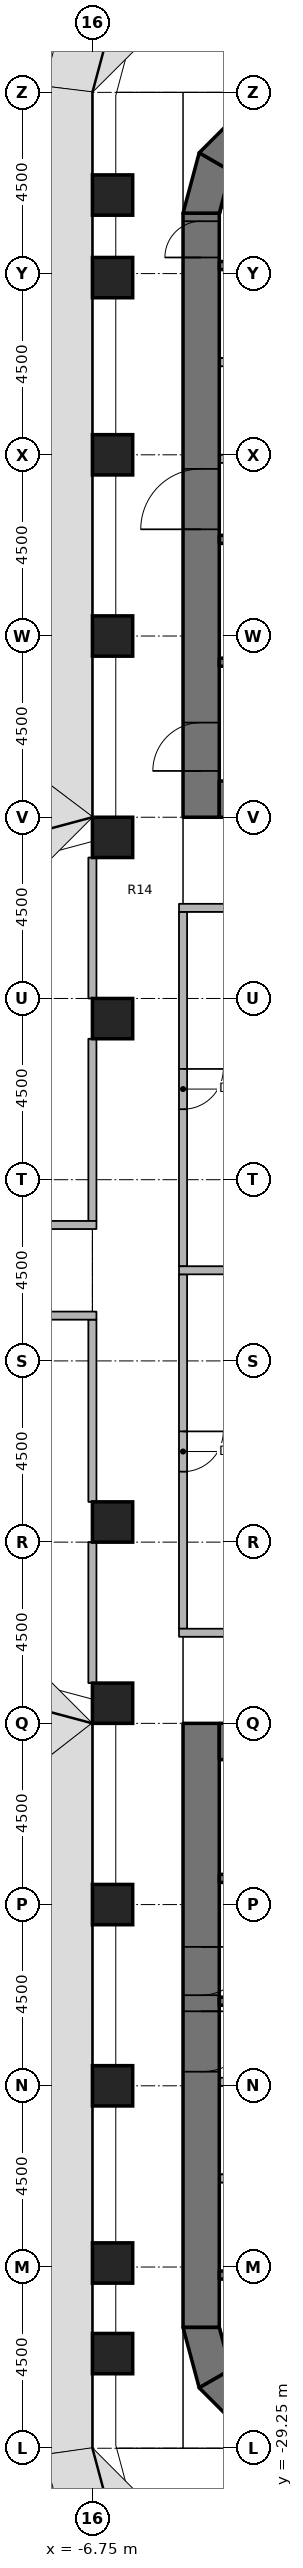
"""IFC4 building model, lengths in metres.
Left out: names, types, materials, properties, quantities, classifications, styles, units other than length and angle.
Written with IfcOpenShell. Run it as: python <this file> out.ifc"""

import sys

from ifc_helpers import new_model, si_unit, direction, frame, frame_2d, origin, origin_2d, place, context, subcontext, project, spatial, polyline, rectangle, outline, extrude, element, fill, save


model = new_model("IFC4")
c1 = context("Model", 3, precision=1e-05, world=origin(), true_north=direction((0.0, 1.0)))
c2 = subcontext(c1, "Body", "Model", "MODEL_VIEW")
j1 = project(units=[si_unit("LENGTHUNIT", "METRE"), si_unit("PLANEANGLEUNIT", "RADIAN")], contexts=[c1])
p1 = place(None, origin())
s1 = spatial("IfcSite", under=j1, at=p1, CompositionType="ELEMENT")
p2 = place(p1, origin())
s2 = spatial("IfcBuilding", under=s1, at=p2, CompositionType="ELEMENT")
p3 = place(p2, frame((0.0, 0.0, 56.4)))
s3 = spatial("IfcBuildingStorey", under=s2, at=p3, CompositionType="ELEMENT", Elevation=56.4)
for number, where, z_axis, x_axis in (
    (1, (-6.25, -26.9, 0.0), (0.0, 0.0, 1.0), (1.0, 0.0, 0.0)),
    (2, (-6.25, -24.65, 0.0), (0.0, 0.0, 1.0), (1.0, 0.0, 0.0)),
    (3, (-6.25, -20.25, 0.0), (0.0, 0.0, 1.0), (1.0, 0.0, 0.0)),
    (4, (-6.25, -15.75, 0.0), (0.0, 0.0, 1.0), (1.0, 0.0, 0.0)),
    (5, (-6.25, -10.75, 0.0), (0.0, 0.0, 1.0), (1.0, 0.0, 0.0)),
    (6, (-6.25, -6.25, 0.0), (0.0, 0.0, 1.0), (1.0, 0.0, 0.0)),
    (7, (-6.25, 6.25, 0.0), (0.0, 0.0, 1.0), (1.0, 0.0, 0.0)),
    (8, (-6.25, 10.75, 0.0), (0.0, 0.0, 1.0), (1.0, 0.0, 0.0)),
    (9, (-6.25, 15.75, 0.0), (0.0, 0.0, 1.0), (1.0, 0.0, 0.0)),
    (10, (-6.25, 20.25, 0.0), (0.0, 0.0, 1.0), (1.0, 0.0, 0.0)),
    (11, (-6.25, 24.65, 0.0), (0.0, 0.0, 1.0), (1.0, 0.0, 0.0)),
    (12, (-6.25, 26.7, 0.0), (0.0, 0.0, 1.0), (1.0, 0.0, 0.0)),
):
    element("IfcColumn", number, at=place(p3, frame(where, z_axis=z_axis, x_axis=x_axis)), inside=s3, PredefinedType="COLUMN", context=c2, shape_type="SweptSolid", body=[
        extrude(rectangle(XDim=1.0, YDim=1.0, at=origin_2d()), origin(), (0.0, 0.0, 1.0), 4.05),
    ])
p4 = place(p3, frame((-4.05, 11.25, 0.0), z_axis=(0.0, 0.0, 1.0), x_axis=(0.0, 1.0, 0.0)))
e13 = element("IfcWall", 13, at=p4, inside=s3, PredefinedType="SHEAR", context=c2, shape_type="SweptSolid", body=[
    extrude(rectangle(XDim=15.0, YDim=0.9, at=frame_2d((7.5, 0.0))), origin(), (0.0, 0.0, 1.0), 4.2),
])
p5 = place(p4, frame((7.15, 0.0, 0.0)))
e14 = element("IfcOpeningElement", 14, at=p5, cuts=e13, PredefinedType="OPENING", context=c2, shape_type="SweptSolid", body=[
    extrude(rectangle(XDim=1.5, YDim=2.3, at=frame_2d((0.75, 1.15))), frame((0.0, 0.46, 0.0), z_axis=(0.0, -1.0, 0.0), x_axis=(1.0, 0.0, 0.0)), (0.0, 0.0, 1.0), 0.92),
])
p6 = place(p4, frame((13.9, 0.0, 0.0)))
e15 = element("IfcOpeningElement", 15, at=p6, cuts=e13, PredefinedType="OPENING", context=c2, shape_type="SweptSolid", body=[
    extrude(rectangle(XDim=0.9, YDim=2.1, at=frame_2d((0.45, 1.05))), frame((0.0, 0.46, 0.0), z_axis=(0.0, -1.0, 0.0), x_axis=(1.0, 0.0, 0.0)), (0.0, 0.0, 1.0), 0.92),
])
p7 = place(p4, frame((1.15, 0.0, 0.0)))
e16 = element("IfcOpeningElement", 16, at=p7, cuts=e13, PredefinedType="OPENING", context=c2, shape_type="SweptSolid", body=[
    extrude(rectangle(XDim=1.2, YDim=2.1, at=frame_2d((0.6, 1.05))), frame((0.0, 0.46, 0.0), z_axis=(0.0, -1.0, 0.0), x_axis=(1.0, 0.0, 0.0)), (0.0, 0.0, 1.0), 0.92),
])
p8 = place(p3, frame((-3.6, 11.7, 0.0), z_axis=(0.0, 0.0, 1.0), x_axis=(1.0, 0.0, 0.0)))
e17 = element("IfcWall", 17, at=p8, inside=s3, PredefinedType="SHEAR", context=c2, shape_type="SweptSolid", body=[
    extrude(rectangle(XDim=7.2, YDim=0.9, at=frame_2d((3.6, 0.0))), origin(), (0.0, 0.0, 1.0), 4.2),
])
p9 = place(p3, origin())
e18 = element("IfcWall", 18, at=p9, inside=s3, PredefinedType="SHEAR", context=c2, shape_type="SweptSolid", body=[
    extrude(outline(polyline([(-4.5, 26.25), (-4.098, 27.75), (-3.319, 27.3), (-3.6, 26.25), (-4.5, 26.25)])), origin(), (0.0, 0.0, 1.0), 4.2),
])
p10 = place(p3, origin())
e19 = element("IfcWall", 19, at=p10, inside=s3, PredefinedType="SHEAR", context=c2, shape_type="SweptSolid", body=[
    extrude(outline(polyline([(-4.098, 27.75), (-3.0, 28.848), (-2.55, 28.069), (-3.319, 27.3), (-4.098, 27.75)])), origin(), (0.0, 0.0, 1.0), 4.2),
])
p11 = place(p3, frame((-4.05, -11.25, 0.0), z_axis=(0.0, 0.0, 1.0), x_axis=(0.0, -1.0, 0.0)))
e20 = element("IfcWall", 20, at=p11, inside=s3, PredefinedType="SHEAR", context=c2, shape_type="SweptSolid", body=[
    extrude(rectangle(XDim=15.0, YDim=0.9, at=frame_2d((7.5, 0.0))), origin(), (0.0, 0.0, 1.0), 4.2),
])
p12 = place(p11, frame((7.15, 0.0, 0.0)))
e21 = element("IfcOpeningElement", 21, at=p12, cuts=e20, PredefinedType="OPENING", context=c2, shape_type="SweptSolid", body=[
    extrude(rectangle(XDim=1.5, YDim=2.3, at=frame_2d((0.75, 1.15))), frame((0.0, 0.46, 0.0), z_axis=(0.0, -1.0, 0.0), x_axis=(1.0, 0.0, 0.0)), (0.0, 0.0, 1.0), 0.92),
])
p13 = place(p11, frame((5.55, 0.0, 0.0)))
e22 = element("IfcOpeningElement", 22, at=p13, cuts=e20, PredefinedType="OPENING", context=c2, shape_type="SweptSolid", body=[
    extrude(rectangle(XDim=1.2, YDim=2.1, at=frame_2d((0.6, 1.05))), frame((0.0, 0.46, 0.0), z_axis=(0.0, -1.0, 0.0), x_axis=(1.0, 0.0, 0.0)), (0.0, 0.0, 1.0), 0.92),
])
p14 = place(p3, frame((-3.6, -11.7, 0.0), z_axis=(0.0, 0.0, 1.0), x_axis=(1.0, 0.0, 0.0)))
e23 = element("IfcWall", 23, at=p14, inside=s3, PredefinedType="SHEAR", context=c2, shape_type="SweptSolid", body=[
    extrude(rectangle(XDim=7.2, YDim=0.9, at=frame_2d((3.6, 0.0))), origin(), (0.0, 0.0, 1.0), 4.2),
])
p15 = place(p3, origin())
e24 = element("IfcWall", 24, at=p15, inside=s3, PredefinedType="SHEAR", context=c2, shape_type="SweptSolid", body=[
    extrude(outline(polyline([(-4.5, -26.25), (-4.098, -27.75), (-3.319, -27.3), (-3.6, -26.25), (-4.5, -26.25)])), origin(), (0.0, 0.0, 1.0), 4.2),
])
p16 = place(p3, origin())
e25 = element("IfcWall", 25, at=p16, inside=s3, PredefinedType="SHEAR", context=c2, shape_type="SweptSolid", body=[
    extrude(outline(polyline([(-4.098, -27.75), (-3.0, -28.848), (-2.55, -28.069), (-3.319, -27.3), (-4.098, -27.75)])), origin(), (0.0, 0.0, 1.0), 4.2),
])
for number, where, z_axis, x_axis in (
    (26, (-3.6, 24.95, 0.0), (0.0, 0.0, 1.0), (1.0, 0.0, 0.0)),
    (27, (-3.6, 18.15, 0.0), (0.0, 0.0, 1.0), (1.0, 0.0, 0.0)),
    (28, (-3.6, 15.1, 0.0), (0.0, 0.0, 1.0), (1.0, 0.0, 0.0)),
):
    element("IfcWall", number, at=place(p3, frame(where, z_axis=z_axis, x_axis=x_axis)), inside=s3, PredefinedType="SHEAR", context=c2, shape_type="SweptSolid", body=[
        extrude(rectangle(XDim=7.2, YDim=0.2, at=frame_2d((3.6, 0.0))), origin(), (0.0, 0.0, 1.0), 4.05),
    ])
p17 = place(p3, frame((-3.6, 20.15, 0.0), z_axis=(0.0, 0.0, 1.0), x_axis=(1.0, 0.0, 0.0)))
e29 = element("IfcWall", 29, at=p17, inside=s3, PredefinedType="PARTITIONING", context=c2, shape_type="SweptSolid", body=[
    extrude(rectangle(XDim=2.7, YDim=0.2, at=frame_2d((1.35, 0.0))), origin(), (0.0, 0.0, 1.0), 4.05),
])
p18 = place(p3, frame((-3.6, 22.55, 0.0), z_axis=(0.0, 0.0, 1.0), x_axis=(1.0, 0.0, 0.0)))
e30 = element("IfcWall", 30, at=p18, inside=s3, PredefinedType="PARTITIONING", context=c2, shape_type="SweptSolid", body=[
    extrude(rectangle(XDim=2.5, YDim=0.2, at=frame_2d((1.25, 0.0))), origin(), (0.0, 0.0, 1.0), 4.05),
])
for number, where, z_axis, x_axis in (
    (31, (3.6, -24.95, 0.0), (0.0, 0.0, 1.0), (-1.0, 0.0, 0.0)),
    (32, (3.6, -18.15, 0.0), (0.0, 0.0, 1.0), (-1.0, 0.0, 0.0)),
    (33, (3.6, -15.1, 0.0), (0.0, 0.0, 1.0), (-1.0, 0.0, 0.0)),
):
    element("IfcWall", number, at=place(p3, frame(where, z_axis=z_axis, x_axis=x_axis)), inside=s3, PredefinedType="SHEAR", context=c2, shape_type="SweptSolid", body=[
        extrude(rectangle(XDim=7.2, YDim=0.2, at=frame_2d((3.6, 0.0))), origin(), (0.0, 0.0, 1.0), 4.05),
    ])
p19 = place(p3, frame((-0.9, -20.15, 0.0), z_axis=(0.0, 0.0, 1.0), x_axis=(-1.0, 0.0, 0.0)))
e34 = element("IfcWall", 34, at=p19, inside=s3, PredefinedType="PARTITIONING", context=c2, shape_type="SweptSolid", body=[
    extrude(rectangle(XDim=2.7, YDim=0.2, at=frame_2d((1.35, 0.0))), origin(), (0.0, 0.0, 1.0), 4.05),
])
p20 = place(p3, frame((-1.1, -22.55, 0.0), z_axis=(0.0, 0.0, 1.0), x_axis=(-1.0, 0.0, 0.0)))
e35 = element("IfcWall", 35, at=p20, inside=s3, PredefinedType="PARTITIONING", context=c2, shape_type="SweptSolid", body=[
    extrude(rectangle(XDim=2.5, YDim=0.2, at=frame_2d((1.25, 0.0))), origin(), (0.0, 0.0, 1.0), 4.05),
])
p21 = place(p3, frame((-4.5, 8.9, 0.0), z_axis=(0.0, 0.0, 1.0), x_axis=(0.0, -1.0, 0.0)))
e36 = element("IfcWall", 36, at=p21, inside=s3, PredefinedType="PARTITIONING", context=c2, shape_type="SweptSolid", body=[
    extrude(rectangle(XDim=8.8, YDim=0.2, at=frame_2d((4.4, 0.0))), origin(), (0.0, 0.0, 1.0), 3.131),
])
p22 = place(p21, frame((3.9, 0.0, 0.0)))
e37 = element("IfcOpeningElement", 37, at=p22, cuts=e36, PredefinedType="OPENING", context=c2, shape_type="SweptSolid", body=[
    extrude(rectangle(XDim=1.0, YDim=2.1, at=frame_2d((0.5, 1.05))), frame((0.0, 0.11, 0.0), z_axis=(0.0, -1.0, 0.0), x_axis=(1.0, 0.0, 0.0)), (0.0, 0.0, 1.0), 0.22),
])
p23 = place(p3, frame((-4.5, -0.1, 0.0), z_axis=(0.0, 0.0, 1.0), x_axis=(0.0, -1.0, 0.0)))
e38 = element("IfcWall", 38, at=p23, inside=s3, PredefinedType="PARTITIONING", context=c2, shape_type="SweptSolid", body=[
    extrude(rectangle(XDim=8.8, YDim=0.2, at=frame_2d((4.4, 0.0))), origin(), (0.0, 0.0, 1.0), 3.131),
])
p24 = place(p23, frame((3.9, 0.0, 0.0)))
e39 = element("IfcOpeningElement", 39, at=p24, cuts=e38, PredefinedType="OPENING", context=c2, shape_type="SweptSolid", body=[
    extrude(rectangle(XDim=1.0, YDim=2.1, at=frame_2d((0.5, 1.05))), frame((0.0, 0.11, 0.0), z_axis=(0.0, -1.0, 0.0), x_axis=(1.0, 0.0, 0.0)), (0.0, 0.0, 1.0), 0.22),
])
p25 = place(p3, frame((-6.75, 1.225, 0.0), z_axis=(0.0, 0.0, 1.0), x_axis=(0.0, 1.0, 0.0)))
e40 = element("IfcWall", 40, at=p25, inside=s3, PredefinedType="PARTITIONING", context=c2, shape_type="SweptSolid", body=[
    extrude(rectangle(XDim=4.525, YDim=0.2, at=frame_2d((2.262, 0.0))), origin(), (0.0, 0.0, 1.0), 3.131),
])
for number, where, z_axis, x_axis in (
    (41, (-6.75, 6.75, 0.0), (0.0, 0.0, 1.0), (0.0, 1.0, 0.0)),
    (42, (-6.75, -10.25, 0.0), (0.0, 0.0, 1.0), (0.0, 1.0, 0.0)),
):
    element("IfcWall", number, at=place(p3, frame(where, z_axis=z_axis, x_axis=x_axis)), inside=s3, PredefinedType="PARTITIONING", context=c2, shape_type="SweptSolid", body=[
        extrude(rectangle(XDim=3.5, YDim=0.2, at=frame_2d((1.75, 0.0))), origin(), (0.0, 0.0, 1.0), 3.131),
    ])
p26 = place(p3, frame((-6.75, -5.75, 0.0), z_axis=(0.0, 0.0, 1.0), x_axis=(0.0, 1.0, 0.0)))
e43 = element("IfcWall", 43, at=p26, inside=s3, PredefinedType="PARTITIONING", context=c2, shape_type="SweptSolid", body=[
    extrude(rectangle(XDim=4.525, YDim=0.2, at=frame_2d((2.262, 0.0))), origin(), (0.0, 0.0, 1.0), 3.131),
])
for number, where, z_axis, x_axis in (
    (44, (-4.6, 9.0, 0.0), (0.0, 0.0, 1.0), (1.0, 0.0, 0.0)),
    (45, (-4.6, -9.0, 0.0), (0.0, 0.0, 1.0), (1.0, 0.0, 0.0)),
    (46, (-4.6, 0.0, 0.0), (0.0, 0.0, 1.0), (1.0, 0.0, 0.0)),
):
    element("IfcWall", number, at=place(p3, frame(where, z_axis=z_axis, x_axis=x_axis)), inside=s3, PredefinedType="PARTITIONING", context=c2, shape_type="SweptSolid", body=[
        extrude(rectangle(XDim=4.7, YDim=0.2, at=frame_2d((2.35, 0.0))), origin(), (0.0, 0.0, 1.0), 3.131),
    ])
p27 = place(p3, frame((-11.35, 1.125, 0.0), z_axis=(0.0, 0.0, 1.0), x_axis=(1.0, 0.0, 0.0)))
e47 = element("IfcWall", 47, at=p27, inside=s3, PredefinedType="PARTITIONING", context=c2, shape_type="SweptSolid", body=[
    extrude(rectangle(XDim=4.7, YDim=0.2, at=frame_2d((2.35, 0.0))), origin(), (0.0, 0.0, 1.0), 3.131),
])
p28 = place(p27, frame((1.85, 0.0, 0.0)))
e48 = element("IfcOpeningElement", 48, at=p28, cuts=e47, PredefinedType="OPENING", context=c2, shape_type="SweptSolid", body=[
    extrude(rectangle(XDim=1.0, YDim=2.1, at=frame_2d((0.5, 1.05))), frame((0.0, 0.11, 0.0), z_axis=(0.0, -1.0, 0.0), x_axis=(1.0, 0.0, 0.0)), (0.0, 0.0, 1.0), 0.22),
])
p29 = place(p3, frame((-6.65, -1.125, 0.0), z_axis=(0.0, 0.0, 1.0), x_axis=(-1.0, 0.0, 0.0)))
e49 = element("IfcWall", 49, at=p29, inside=s3, PredefinedType="PARTITIONING", context=c2, shape_type="SweptSolid", body=[
    extrude(rectangle(XDim=4.7, YDim=0.2, at=frame_2d((2.35, 0.0))), origin(), (0.0, 0.0, 1.0), 3.131),
])
p30 = place(p29, frame((1.85, 0.0, 0.0)))
e50 = element("IfcOpeningElement", 50, at=p30, cuts=e49, PredefinedType="OPENING", context=c2, shape_type="SweptSolid", body=[
    extrude(rectangle(XDim=1.0, YDim=2.1, at=frame_2d((0.5, 1.05))), frame((0.0, 0.11, 0.0), z_axis=(0.0, -1.0, 0.0), x_axis=(1.0, 0.0, 0.0)), (0.0, 0.0, 1.0), 0.22),
])
p31 = place(p5, origin())
e51 = element("IfcDoor", 51, at=p31, inside=s3, OperationType="DOUBLE_DOOR_SINGLE_SWING", PredefinedType="DOOR", context=c2, shape_type="SweptSolid", body=[
    extrude(rectangle(XDim=1.5, YDim=2.3, at=frame_2d((0.75, 1.15))), frame((0.0, 0.025, 0.0), z_axis=(0.0, -1.0, 0.0), x_axis=(1.0, 0.0, 0.0)), (0.0, 0.0, 1.0), 0.05),
])
fill(e14, e51)
p32 = place(p6, origin())
e52 = element("IfcDoor", 52, at=p32, inside=s3, OperationType="SINGLE_SWING_RIGHT", PredefinedType="DOOR", context=c2, shape_type="SweptSolid", body=[
    extrude(rectangle(XDim=0.9, YDim=2.1, at=frame_2d((0.45, 1.05))), frame((0.0, 0.025, 0.0), z_axis=(0.0, -1.0, 0.0), x_axis=(1.0, 0.0, 0.0)), (0.0, 0.0, 1.0), 0.05),
])
fill(e15, e52)
p33 = place(p7, origin())
e53 = element("IfcDoor", 53, at=p33, inside=s3, OperationType="SINGLE_SWING_LEFT", PredefinedType="DOOR", context=c2, shape_type="SweptSolid", body=[
    extrude(rectangle(XDim=1.2, YDim=2.1, at=frame_2d((0.6, 1.05))), frame((0.0, 0.025, 0.0), z_axis=(0.0, -1.0, 0.0), x_axis=(1.0, 0.0, 0.0)), (0.0, 0.0, 1.0), 0.05),
])
fill(e16, e53)
p34 = place(p12, origin())
e54 = element("IfcDoor", 54, at=p34, inside=s3, OperationType="DOUBLE_DOOR_SINGLE_SWING", PredefinedType="DOOR", context=c2, shape_type="SweptSolid", body=[
    extrude(rectangle(XDim=1.5, YDim=2.3, at=frame_2d((0.75, 1.15))), frame((0.0, 0.025, 0.0), z_axis=(0.0, -1.0, 0.0), x_axis=(1.0, 0.0, 0.0)), (0.0, 0.0, 1.0), 0.05),
])
fill(e21, e54)
p35 = place(p13, origin())
e55 = element("IfcDoor", 55, at=p35, inside=s3, OperationType="SINGLE_SWING_LEFT", PredefinedType="DOOR", context=c2, shape_type="SweptSolid", body=[
    extrude(rectangle(XDim=1.2, YDim=2.1, at=frame_2d((0.6, 1.05))), frame((0.0, 0.025, 0.0), z_axis=(0.0, -1.0, 0.0), x_axis=(1.0, 0.0, 0.0)), (0.0, 0.0, 1.0), 0.05),
])
fill(e22, e55)
p36 = place(p22, origin())
e56 = element("IfcDoor", 56, at=p36, inside=s3, OperationType="SINGLE_SWING_RIGHT", PredefinedType="DOOR", context=c2, shape_type="SweptSolid", body=[
    extrude(rectangle(XDim=1.0, YDim=2.1, at=frame_2d((0.5, 1.05))), frame((0.0, 0.025, 0.0), z_axis=(0.0, -1.0, 0.0), x_axis=(1.0, 0.0, 0.0)), (0.0, 0.0, 1.0), 0.05),
])
fill(e37, e56)
p37 = place(p24, origin())
e57 = element("IfcDoor", 57, at=p37, inside=s3, OperationType="SINGLE_SWING_RIGHT", PredefinedType="DOOR", context=c2, shape_type="SweptSolid", body=[
    extrude(rectangle(XDim=1.0, YDim=2.1, at=frame_2d((0.5, 1.05))), frame((0.0, 0.025, 0.0), z_axis=(0.0, -1.0, 0.0), x_axis=(1.0, 0.0, 0.0)), (0.0, 0.0, 1.0), 0.05),
])
fill(e39, e57)
save(model, sys.argv[1])
